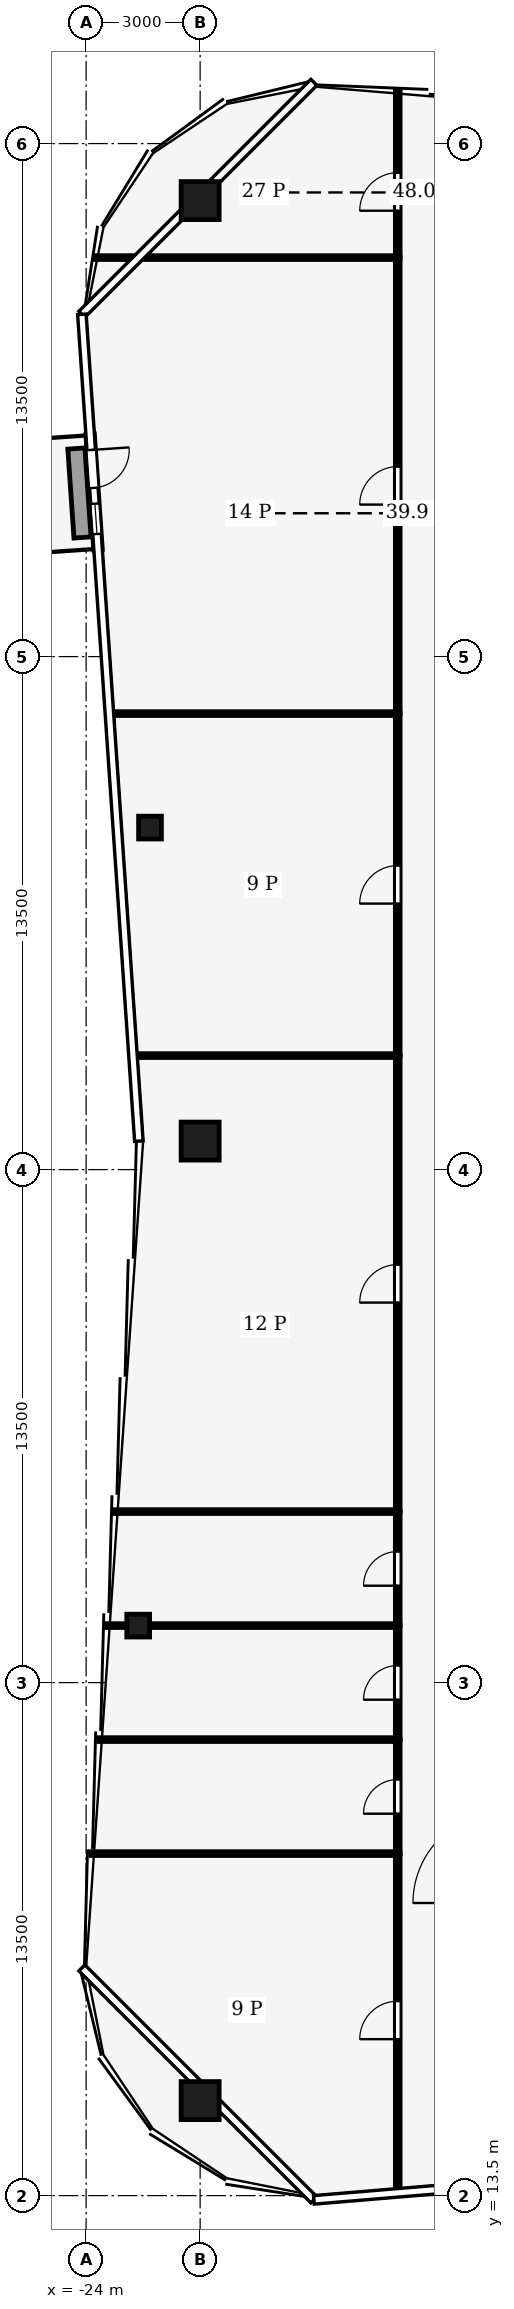
"""IFC4 building model, lengths in metres.
Left out: names, types, materials, properties, quantities, classifications, styles, units other than length and angle.
Written with IfcOpenShell. Run it as: python <this file> out.ifc"""

import sys

from ifc_helpers import new_model, si_unit, direction, frame, frame_2d, origin, origin_2d, place, context, subcontext, project, spatial, rectangle, hollow_rectangle, extrude, element, fill, save


model = new_model("IFC4")
c1 = context("Model", 3, precision=1e-05, world=origin(), true_north=direction((0.0, 1.0)))
c2 = subcontext(c1, "Body", "Model", "MODEL_VIEW")
j1 = project(units=[si_unit("LENGTHUNIT", "METRE"), si_unit("PLANEANGLEUNIT", "RADIAN")], contexts=[c1])
p1 = place(None, origin())
s1 = spatial("IfcSite", under=j1, at=p1, CompositionType="ELEMENT")
p2 = place(p1, origin())
s2 = spatial("IfcBuilding", under=s1, at=p2, CompositionType="ELEMENT")
p3 = place(p2, frame((0.0, 0.0, 258.0)))
s3 = spatial("IfcBuildingStorey", under=s2, at=p3, CompositionType="ELEMENT", Elevation=258.0)
for number, where, z_axis, x_axis in (
    (1, (-21.0, 66.0, 0.0), (0.0, 0.0, 1.0), (1.0, 0.0, 0.0)),
    (2, (-21.0, 16.0, 0.0), (0.0, 0.0, 1.0), (1.0, 0.0, 0.0)),
    (3, (-21.0, 41.25, 0.0), (0.0, 0.0, 1.0), (1.0, 0.0, 0.0)),
):
    element("IfcColumn", number, at=place(p3, frame(where, z_axis=z_axis, x_axis=x_axis)), inside=s3, PredefinedType="COLUMN", context=c2, shape_type="SweptSolid", body=[
        extrude(hollow_rectangle(XDim=1.0, YDim=1.0, WallThickness=0.045, at=origin_2d()), origin(), (0.0, 0.0, 1.0), 4.0),
    ])
for number, where, z_axis, x_axis in (
    (4, (-22.629, 28.5, 0.0), (0.0, 0.0, 1.0), (1.0, 0.0, 0.0)),
    (5, (-22.319, 49.5, 0.0), (0.0, 0.0, 1.0), (1.0, 0.0, 0.0)),
):
    element("IfcColumn", number, at=place(p3, frame(where, z_axis=z_axis, x_axis=x_axis)), inside=s3, PredefinedType="COLUMN", context=c2, shape_type="SweptSolid", body=[
        extrude(hollow_rectangle(XDim=0.6, YDim=0.6, WallThickness=0.025, at=origin_2d()), origin(), (0.0, 0.0, 1.0), 4.0),
    ])
p4 = place(p3, frame((-23.895, 59.851, 0.0), z_axis=(0.0, 0.0, 1.0), x_axis=(0.06875808698, -0.99763336225, 0.0)))
e6 = element("IfcWall", 6, at=p4, inside=s3, PredefinedType="SOLIDWALL", context=c2, shape_type="SweptSolid", body=[
    extrude(rectangle(XDim=3.047, YDim=0.224, at=frame_2d((1.523, 0.0))), origin(), (0.0, 0.0, 1.0), 3.65),
])
p5 = place(p4, frame((0.416, 0.0, 0.0)))
e7 = element("IfcOpeningElement", 7, at=p5, cuts=e6, PredefinedType="OPENING", context=c2, shape_type="SweptSolid", body=[
    extrude(rectangle(XDim=1.0, YDim=2.1, at=frame_2d((0.5, 1.05))), frame((0.0, 0.122, 0.0), z_axis=(0.0, -1.0, 0.0), x_axis=(1.0, 0.0, 0.0)), (0.0, 0.0, 1.0), 0.244),
])
p6 = place(p4, frame((1.831, 0.0, 0.9)))
e8 = element("IfcOpeningElement", 8, at=p6, cuts=e6, PredefinedType="OPENING", context=c2, shape_type="SweptSolid", body=[
    extrude(rectangle(XDim=0.8, YDim=1.2, at=frame_2d((0.4, 0.6))), frame((0.0, 0.122, 0.0), z_axis=(0.0, -1.0, 0.0), x_axis=(1.0, 0.0, 0.0)), (0.0, 0.0, 1.0), 0.244),
])
p7 = place(p3, frame((-24.257, 59.475, 0.0), z_axis=(0.0, 0.0, 1.0), x_axis=(0.06877709495, -0.997632052016, 0.0)))
e9 = element("IfcWall", 9, at=p7, inside=s3, PredefinedType="USERDEFINED", context=c2, shape_type="SweptSolid", body=[
    extrude(rectangle(XDim=2.346, YDim=0.45, at=frame_2d((1.173, 0.0))), origin(), (0.0, 0.0, 1.0), 0.4),
])
p8 = place(p3, frame((-15.8, 13.603, 0.0), z_axis=(0.0, 0.0, 1.0), x_axis=(0.0, 1.0, 0.0)))
e10 = element("IfcWall", 10, at=p8, inside=s3, PredefinedType="PARTITIONING", context=c2, shape_type="SweptSolid", body=[
    extrude(rectangle(XDim=8.897, YDim=0.125, at=frame_2d((4.448, 0.0))), origin(), (0.0, 0.0, 1.0), 3.04),
])
p9 = place(p8, frame((4.013, 0.0, 0.0)))
e11 = element("IfcOpeningElement", 11, at=p9, cuts=e10, PredefinedType="OPENING", context=c2, shape_type="SweptSolid", body=[
    extrude(rectangle(XDim=1.0, YDim=2.1, at=frame_2d((0.5, 1.05))), frame((0.0, 0.073, 0.0), z_axis=(0.0, -1.0, 0.0), x_axis=(1.0, 0.0, 0.0)), (0.0, 0.0, 1.0), 0.145),
])
p10 = place(p3, frame((-15.8, 22.5, 0.0), z_axis=(0.0, 0.0, 1.0), x_axis=(0.0, 1.0, 0.0)))
e12 = element("IfcWall", 12, at=p10, inside=s3, PredefinedType="PARTITIONING", context=c2, shape_type="SweptSolid", body=[
    extrude(rectangle(XDim=3.0, YDim=0.125, at=frame_2d((1.5, 0.0))), origin(), (0.0, 0.0, 1.0), 3.44),
])
p11 = place(p10, frame((1.05, 0.0, 0.0)))
e13 = element("IfcOpeningElement", 13, at=p11, cuts=e12, PredefinedType="OPENING", context=c2, shape_type="SweptSolid", body=[
    extrude(rectangle(XDim=0.9, YDim=2.1, at=frame_2d((0.45, 1.05))), frame((0.0, 0.073, 0.0), z_axis=(0.0, -1.0, 0.0), x_axis=(1.0, 0.0, 0.0)), (0.0, 0.0, 1.0), 0.145),
])
p12 = place(p3, frame((-15.8, 25.5, 0.0), z_axis=(0.0, 0.0, 1.0), x_axis=(0.0, 1.0, 0.0)))
e14 = element("IfcWall", 14, at=p12, inside=s3, PredefinedType="PARTITIONING", context=c2, shape_type="SweptSolid", body=[
    extrude(rectangle(XDim=3.0, YDim=0.125, at=frame_2d((1.5, 0.0))), origin(), (0.0, 0.0, 1.0), 3.87),
])
p13 = place(p12, frame((1.05, 0.0, 0.0)))
e15 = element("IfcOpeningElement", 15, at=p13, cuts=e14, PredefinedType="OPENING", context=c2, shape_type="SweptSolid", body=[
    extrude(rectangle(XDim=0.9, YDim=2.1, at=frame_2d((0.45, 1.05))), frame((0.0, 0.073, 0.0), z_axis=(0.0, -1.0, 0.0), x_axis=(1.0, 0.0, 0.0)), (0.0, 0.0, 1.0), 0.145),
])
p14 = place(p3, frame((-15.8, 28.5, 0.0), z_axis=(0.0, 0.0, 1.0), x_axis=(0.0, 1.0, 0.0)))
e16 = element("IfcWall", 16, at=p14, inside=s3, PredefinedType="PARTITIONING", context=c2, shape_type="SweptSolid", body=[
    extrude(rectangle(XDim=3.0, YDim=0.125, at=frame_2d((1.5, 0.0))), origin(), (0.0, 0.0, 1.0), 3.87),
])
p15 = place(p14, frame((1.05, 0.0, 0.0)))
e17 = element("IfcOpeningElement", 17, at=p15, cuts=e16, PredefinedType="OPENING", context=c2, shape_type="SweptSolid", body=[
    extrude(rectangle(XDim=0.9, YDim=2.1, at=frame_2d((0.45, 1.05))), frame((0.0, 0.073, 0.0), z_axis=(0.0, -1.0, 0.0), x_axis=(1.0, 0.0, 0.0)), (0.0, 0.0, 1.0), 0.145),
])
p16 = place(p3, frame((-15.8, 31.5, 0.0), z_axis=(0.0, 0.0, 1.0), x_axis=(0.0, 1.0, 0.0)))
e18 = element("IfcWall", 18, at=p16, inside=s3, PredefinedType="PARTITIONING", context=c2, shape_type="SweptSolid", body=[
    extrude(rectangle(XDim=12.0, YDim=0.125, at=frame_2d((6.0, 0.0))), origin(), (0.0, 0.0, 1.0), 3.14),
])
p17 = place(p16, frame((5.5, 0.0, 0.0)))
e19 = element("IfcOpeningElement", 19, at=p17, cuts=e18, PredefinedType="OPENING", context=c2, shape_type="SweptSolid", body=[
    extrude(rectangle(XDim=1.0, YDim=2.1, at=frame_2d((0.5, 1.05))), frame((0.0, 0.073, 0.0), z_axis=(0.0, -1.0, 0.0), x_axis=(1.0, 0.0, 0.0)), (0.0, 0.0, 1.0), 0.145),
])
p18 = place(p3, frame((-15.8, 43.5, 0.0), z_axis=(0.0, 0.0, 1.0), x_axis=(0.0, 1.0, 0.0)))
e20 = element("IfcWall", 20, at=p18, inside=s3, PredefinedType="PARTITIONING", context=c2, shape_type="SweptSolid", body=[
    extrude(rectangle(XDim=9.0, YDim=0.125, at=frame_2d((4.5, 0.0))), origin(), (0.0, 0.0, 1.0), 3.24),
])
p19 = place(p18, frame((4.0, 0.0, 0.0)))
e21 = element("IfcOpeningElement", 21, at=p19, cuts=e20, PredefinedType="OPENING", context=c2, shape_type="SweptSolid", body=[
    extrude(rectangle(XDim=1.0, YDim=2.1, at=frame_2d((0.5, 1.05))), frame((0.0, 0.073, 0.0), z_axis=(0.0, -1.0, 0.0), x_axis=(1.0, 0.0, 0.0)), (0.0, 0.0, 1.0), 0.145),
])
p20 = place(p3, frame((-15.8, 52.5, 0.0), z_axis=(0.0, 0.0, 1.0), x_axis=(0.0, 1.0, 0.0)))
e22 = element("IfcWall", 22, at=p20, inside=s3, PredefinedType="PARTITIONING", context=c2, shape_type="SweptSolid", body=[
    extrude(rectangle(XDim=12.0, YDim=0.125, at=frame_2d((6.0, 0.0))), origin(), (0.0, 0.0, 1.0), 3.87),
])
p21 = place(p20, frame((5.5, 0.0, 0.0)))
e23 = element("IfcOpeningElement", 23, at=p21, cuts=e22, PredefinedType="OPENING", context=c2, shape_type="SweptSolid", body=[
    extrude(rectangle(XDim=1.0, YDim=2.1, at=frame_2d((0.5, 1.05))), frame((0.0, 0.073, 0.0), z_axis=(0.0, -1.0, 0.0), x_axis=(1.0, 0.0, 0.0)), (0.0, 0.0, 1.0), 0.145),
])
p22 = place(p3, frame((-15.8, 64.5, 0.0), z_axis=(0.0, 0.0, 1.0), x_axis=(0.0, 1.0, 0.0)))
e24 = element("IfcWall", 24, at=p22, inside=s3, PredefinedType="PARTITIONING", context=c2, shape_type="SweptSolid", body=[
    extrude(rectangle(XDim=4.397, YDim=0.125, at=frame_2d((2.198, 0.0))), origin(), (0.0, 0.0, 1.0), 3.04),
])
p23 = place(p22, frame((1.233, 0.0, 0.0)))
e25 = element("IfcOpeningElement", 25, at=p23, cuts=e24, PredefinedType="OPENING", context=c2, shape_type="SweptSolid", body=[
    extrude(rectangle(XDim=1.0, YDim=2.1, at=frame_2d((0.5, 1.05))), frame((0.0, 0.073, 0.0), z_axis=(0.0, -1.0, 0.0), x_axis=(1.0, 0.0, 0.0)), (0.0, 0.0, 1.0), 0.145),
])
p24 = place(p3, frame((-15.8, 22.5, 0.0), z_axis=(0.0, 0.0, 1.0), x_axis=(-1.0, 0.0, 0.0)))
e26 = element("IfcWall", 26, at=p24, inside=s3, PredefinedType="PARTITIONING", context=c2, shape_type="SweptSolid", body=[
    extrude(rectangle(XDim=8.073, YDim=0.1, at=frame_2d((4.037, 0.0))), origin(), (0.0, 0.0, 1.0), 3.04),
])
p25 = place(p3, frame((-15.8, 25.5, 0.0), z_axis=(0.0, 0.0, 1.0), x_axis=(-1.0, 0.0, 0.0)))
e27 = element("IfcWall", 27, at=p25, inside=s3, PredefinedType="PARTITIONING", context=c2, shape_type="SweptSolid", body=[
    extrude(rectangle(XDim=7.866, YDim=0.1, at=frame_2d((3.933, 0.0))), origin(), (0.0, 0.0, 1.0), 3.04),
])
p26 = place(p3, frame((-15.8, 28.5, 0.0), z_axis=(0.0, 0.0, 1.0), x_axis=(-1.0, 0.0, 0.0)))
e28 = element("IfcWall", 28, at=p26, inside=s3, PredefinedType="PARTITIONING", context=c2, shape_type="SweptSolid", body=[
    extrude(rectangle(XDim=7.659, YDim=0.1, at=frame_2d((3.83, 0.0))), origin(), (0.0, 0.0, 1.0), 3.04),
])
p27 = place(p3, frame((-15.8, 31.5, 0.0), z_axis=(0.0, 0.0, 1.0), x_axis=(-1.0, 0.0, 0.0)))
e29 = element("IfcWall", 29, at=p27, inside=s3, PredefinedType="PARTITIONING", context=c2, shape_type="SweptSolid", body=[
    extrude(rectangle(XDim=7.452, YDim=0.1, at=frame_2d((3.726, 0.0))), origin(), (0.0, 0.0, 1.0), 3.04),
])
p28 = place(p3, frame((-15.8, 43.5, 0.0), z_axis=(0.0, 0.0, 1.0), x_axis=(-1.0, 0.0, 0.0)))
e30 = element("IfcWall", 30, at=p28, inside=s3, PredefinedType="PARTITIONING", context=c2, shape_type="SweptSolid", body=[
    extrude(rectangle(XDim=6.935, YDim=0.1, at=frame_2d((3.468, 0.0))), origin(), (0.0, 0.0, 1.0), 3.04),
])
p29 = place(p3, frame((-15.8, 52.5, 0.0), z_axis=(0.0, 0.0, 1.0), x_axis=(-1.0, 0.0, 0.0)))
e31 = element("IfcWall", 31, at=p29, inside=s3, PredefinedType="PARTITIONING", context=c2, shape_type="SweptSolid", body=[
    extrude(rectangle(XDim=7.556, YDim=0.1, at=frame_2d((3.778, 0.0))), origin(), (0.0, 0.0, 1.0), 3.04),
])
p30 = place(p3, frame((-15.8, 64.5, 0.0), z_axis=(0.0, 0.0, 1.0), x_axis=(-1.0, 0.0, 0.0)))
e32 = element("IfcWall", 32, at=p30, inside=s3, PredefinedType="PARTITIONING", context=c2, shape_type="SweptSolid", body=[
    extrude(rectangle(XDim=7.981, YDim=0.1, at=frame_2d((3.991, 0.0))), origin(), (0.0, 0.0, 1.0), 2.93),
])
p31 = place(p5, origin())
e33 = element("IfcDoor", 33, at=p31, inside=s3, OperationType="SINGLE_SWING_LEFT", PredefinedType="DOOR", context=c2, shape_type="SweptSolid", body=[
    extrude(rectangle(XDim=1.0, YDim=2.1, at=frame_2d((0.5, 1.05))), frame((0.0, 0.025, 0.0), z_axis=(0.0, -1.0, 0.0), x_axis=(1.0, 0.0, 0.0)), (0.0, 0.0, 1.0), 0.05),
])
fill(e7, e33)
p32 = place(p6, origin())
e34 = element("IfcWindow", 34, at=p32, inside=s3, PartitioningType="SINGLE_PANEL", PredefinedType="WINDOW", context=c2, shape_type="SweptSolid", body=[
    extrude(rectangle(XDim=0.8, YDim=1.2, at=frame_2d((0.4, 0.6))), frame((0.0, 0.03, 0.0), z_axis=(0.0, -1.0, 0.0), x_axis=(1.0, 0.0, 0.0)), (0.0, 0.0, 1.0), 0.06),
])
fill(e8, e34)
p33 = place(p9, origin())
e35 = element("IfcDoor", 35, at=p33, inside=s3, OperationType="SINGLE_SWING_RIGHT", PredefinedType="DOOR", context=c2, shape_type="SweptSolid", body=[
    extrude(rectangle(XDim=1.0, YDim=2.1, at=frame_2d((0.5, 1.05))), frame((0.0, 0.025, 0.0), z_axis=(0.0, -1.0, 0.0), x_axis=(1.0, 0.0, 0.0)), (0.0, 0.0, 1.0), 0.05),
])
fill(e11, e35)
p34 = place(p11, origin())
e36 = element("IfcDoor", 36, at=p34, inside=s3, OperationType="SINGLE_SWING_RIGHT", PredefinedType="DOOR", context=c2, shape_type="SweptSolid", body=[
    extrude(rectangle(XDim=0.9, YDim=2.1, at=frame_2d((0.45, 1.05))), frame((0.0, 0.025, 0.0), z_axis=(0.0, -1.0, 0.0), x_axis=(1.0, 0.0, 0.0)), (0.0, 0.0, 1.0), 0.05),
])
fill(e13, e36)
p35 = place(p13, origin())
e37 = element("IfcDoor", 37, at=p35, inside=s3, OperationType="SINGLE_SWING_LEFT", PredefinedType="DOOR", context=c2, shape_type="SweptSolid", body=[
    extrude(rectangle(XDim=0.9, YDim=2.1, at=frame_2d((0.45, 1.05))), frame((0.0, 0.025, 0.0), z_axis=(0.0, -1.0, 0.0), x_axis=(1.0, 0.0, 0.0)), (0.0, 0.0, 1.0), 0.05),
])
fill(e15, e37)
p36 = place(p15, origin())
e38 = element("IfcDoor", 38, at=p36, inside=s3, OperationType="SINGLE_SWING_RIGHT", PredefinedType="DOOR", context=c2, shape_type="SweptSolid", body=[
    extrude(rectangle(XDim=0.9, YDim=2.1, at=frame_2d((0.45, 1.05))), frame((0.0, 0.025, 0.0), z_axis=(0.0, -1.0, 0.0), x_axis=(1.0, 0.0, 0.0)), (0.0, 0.0, 1.0), 0.05),
])
fill(e17, e38)
p37 = place(p17, origin())
e39 = element("IfcDoor", 39, at=p37, inside=s3, OperationType="SINGLE_SWING_LEFT", PredefinedType="DOOR", context=c2, shape_type="SweptSolid", body=[
    extrude(rectangle(XDim=1.0, YDim=2.1, at=frame_2d((0.5, 1.05))), frame((0.0, 0.025, 0.0), z_axis=(0.0, -1.0, 0.0), x_axis=(1.0, 0.0, 0.0)), (0.0, 0.0, 1.0), 0.05),
])
fill(e19, e39)
p38 = place(p19, origin())
e40 = element("IfcDoor", 40, at=p38, inside=s3, OperationType="SINGLE_SWING_RIGHT", PredefinedType="DOOR", context=c2, shape_type="SweptSolid", body=[
    extrude(rectangle(XDim=1.0, YDim=2.1, at=frame_2d((0.5, 1.05))), frame((0.0, 0.025, 0.0), z_axis=(0.0, -1.0, 0.0), x_axis=(1.0, 0.0, 0.0)), (0.0, 0.0, 1.0), 0.05),
])
fill(e21, e40)
p39 = place(p21, origin())
e41 = element("IfcDoor", 41, at=p39, inside=s3, OperationType="SINGLE_SWING_LEFT", PredefinedType="DOOR", context=c2, shape_type="SweptSolid", body=[
    extrude(rectangle(XDim=1.0, YDim=2.1, at=frame_2d((0.5, 1.05))), frame((0.0, 0.025, 0.0), z_axis=(0.0, -1.0, 0.0), x_axis=(1.0, 0.0, 0.0)), (0.0, 0.0, 1.0), 0.05),
])
fill(e23, e41)
p40 = place(p23, origin())
e42 = element("IfcDoor", 42, at=p40, inside=s3, OperationType="SINGLE_SWING_LEFT", PredefinedType="DOOR", context=c2, shape_type="SweptSolid", body=[
    extrude(rectangle(XDim=1.0, YDim=2.1, at=frame_2d((0.5, 1.05))), frame((0.0, 0.025, 0.0), z_axis=(0.0, -1.0, 0.0), x_axis=(1.0, 0.0, 0.0)), (0.0, 0.0, 1.0), 0.05),
])
fill(e25, e42)
save(model, sys.argv[1])
